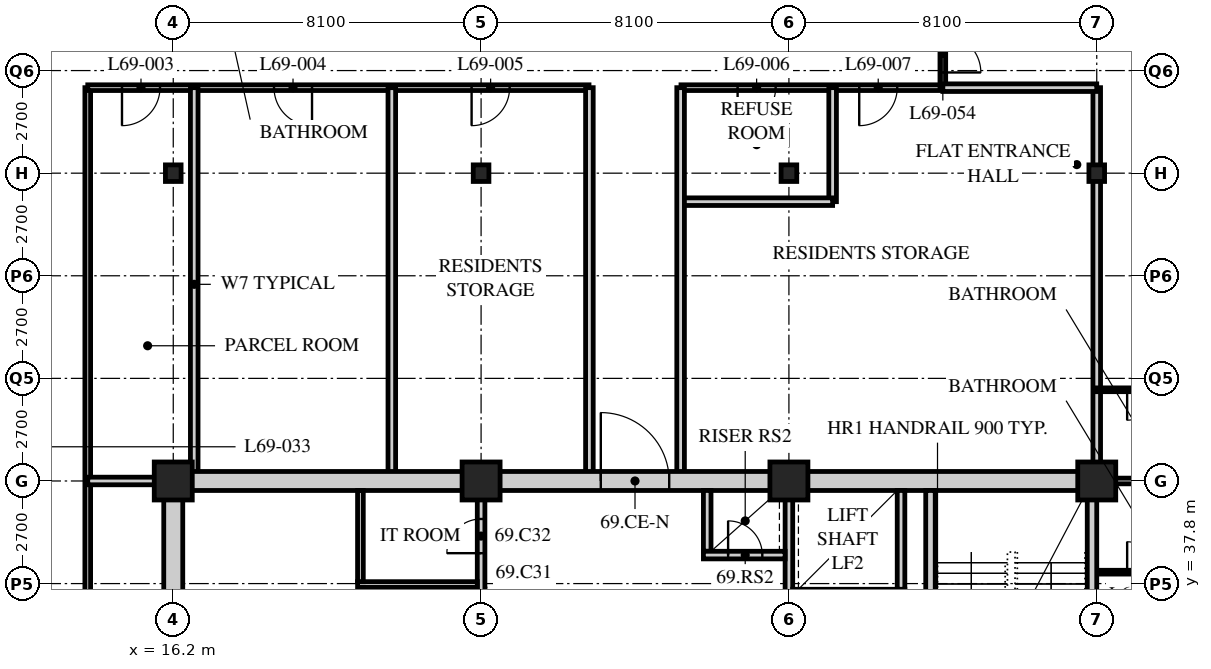
"""IFC4 building model, lengths in metres.
Left out: names, types, materials, properties, quantities, classifications, styles, units other than length and angle.
Written with IfcOpenShell. Run it as: python <this file> out.ifc"""

import sys

from ifc_helpers import new_model, si_unit, direction, frame, frame_2d, origin, origin_2d, place, context, subcontext, project, spatial, rectangle, hollow_rectangle, i_section, extrude, element, fill, save


model = new_model("IFC4")
c1 = context("Model", 3, precision=1e-05, world=origin(), true_north=direction((0.0, 1.0)))
c2 = subcontext(c1, "Body", "Model", "MODEL_VIEW")
j1 = project(units=[si_unit("LENGTHUNIT", "METRE"), si_unit("PLANEANGLEUNIT", "RADIAN")], contexts=[c1])
p1 = place(None, origin())
s1 = spatial("IfcSite", under=j1, at=p1, CompositionType="ELEMENT")
p2 = place(p1, origin())
s2 = spatial("IfcBuilding", under=s1, at=p2, CompositionType="ELEMENT")
p3 = place(p2, frame((0.0, 0.0, 269.7)))
s3 = spatial("IfcBuildingStorey", under=s2, at=p3, CompositionType="ELEMENT", Elevation=269.7)
p4 = place(p3, frame((16.2, 40.5, 0.0), z_axis=(0.0, 0.0, 1.0), x_axis=(1.0, 0.0, 0.0)))
e1 = element("IfcColumn", 1, at=p4, inside=s3, PredefinedType="COLUMN", context=c2, shape_type="SweptSolid", body=[
    extrude(hollow_rectangle(XDim=1.0, YDim=1.0, WallThickness=0.1, at=origin_2d()), origin(), (0.0, 0.0, 1.0), 3.9),
])
p5 = place(p3, frame((16.2, 48.6, 0.0), z_axis=(0.0, 0.0, 1.0), x_axis=(1.0, 0.0, 0.0)))
e2 = element("IfcColumn", 2, at=p5, inside=s3, PredefinedType="COLUMN", context=c2, shape_type="SweptSolid", body=[
    extrude(i_section(OverallWidth=0.412, OverallDepth=0.437, WebThickness=0.036, FlangeThickness=0.058, FilletRadius=0.015, at=origin_2d()), origin(), (0.0, 0.0, 1.0), 3.9),
])
p6 = place(p3, frame((24.3, 40.5, 0.0), z_axis=(0.0, 0.0, 1.0), x_axis=(1.0, 0.0, 0.0)))
e3 = element("IfcColumn", 3, at=p6, inside=s3, PredefinedType="COLUMN", context=c2, shape_type="SweptSolid", body=[
    extrude(hollow_rectangle(XDim=1.0, YDim=1.0, WallThickness=0.1, at=origin_2d()), origin(), (0.0, 0.0, 1.0), 3.9),
])
p7 = place(p3, frame((24.3, 48.6, 0.0), z_axis=(0.0, 0.0, 1.0), x_axis=(1.0, 0.0, 0.0)))
e4 = element("IfcColumn", 4, at=p7, inside=s3, PredefinedType="COLUMN", context=c2, shape_type="SweptSolid", body=[
    extrude(i_section(OverallWidth=0.412, OverallDepth=0.437, WebThickness=0.036, FlangeThickness=0.058, FilletRadius=0.015, at=origin_2d()), origin(), (0.0, 0.0, 1.0), 3.9),
])
p8 = place(p3, frame((32.4, 40.5, 0.0), z_axis=(0.0, 0.0, 1.0), x_axis=(1.0, 0.0, 0.0)))
e5 = element("IfcColumn", 5, at=p8, inside=s3, PredefinedType="COLUMN", context=c2, shape_type="SweptSolid", body=[
    extrude(hollow_rectangle(XDim=1.0, YDim=1.0, WallThickness=0.1, at=origin_2d()), origin(), (0.0, 0.0, 1.0), 3.9),
])
p9 = place(p3, frame((32.4, 48.6, 0.0), z_axis=(0.0, 0.0, 1.0), x_axis=(1.0, 0.0, 0.0)))
e6 = element("IfcColumn", 6, at=p9, inside=s3, PredefinedType="COLUMN", context=c2, shape_type="SweptSolid", body=[
    extrude(i_section(OverallWidth=0.412, OverallDepth=0.437, WebThickness=0.036, FlangeThickness=0.058, FilletRadius=0.015, at=origin_2d()), origin(), (0.0, 0.0, 1.0), 3.9),
])
p10 = place(p3, frame((40.5, 40.5, 0.0), z_axis=(0.0, 0.0, 1.0), x_axis=(1.0, 0.0, 0.0)))
e7 = element("IfcColumn", 7, at=p10, inside=s3, PredefinedType="COLUMN", context=c2, shape_type="SweptSolid", body=[
    extrude(hollow_rectangle(XDim=1.0, YDim=1.0, WallThickness=0.1, at=origin_2d()), origin(), (0.0, 0.0, 1.0), 3.9),
])
p11 = place(p3, frame((40.5, 48.6, 0.0), z_axis=(0.0, 0.0, 1.0), x_axis=(1.0, 0.0, 0.0)))
e8 = element("IfcColumn", 8, at=p11, inside=s3, PredefinedType="COLUMN", context=c2, shape_type="SweptSolid", body=[
    extrude(i_section(OverallWidth=0.412, OverallDepth=0.437, WebThickness=0.036, FlangeThickness=0.058, FilletRadius=0.015, at=origin_2d()), origin(), (0.0, 0.0, 1.0), 3.9),
])
p12 = place(p3, frame((13.95, 24.3, 0.0), z_axis=(0.0, 0.0, 1.0), x_axis=(0.0, 1.0, 0.0)))
e9 = element("IfcWall", 9, at=p12, inside=s3, PredefinedType="PARTITIONING", context=c2, shape_type="SweptSolid", body=[
    extrude(rectangle(XDim=26.55, YDim=0.15, at=frame_2d((13.275, 0.0))), origin(), (0.0, 0.0, 1.0), 3.69),
])
p13 = place(p12, frame((3.55, 0.0, 0.0)))
e10 = element("IfcOpeningElement", 10, at=p13, cuts=e9, PredefinedType="OPENING", context=c2, shape_type="SweptSolid", body=[
    extrude(rectangle(XDim=1.0, YDim=2.1, at=frame_2d((0.5, 1.05))), frame((0.0, 0.085, 0.0), z_axis=(0.0, -1.0, 0.0), x_axis=(1.0, 0.0, 0.0)), (0.0, 0.0, 1.0), 0.17),
])
p14 = place(p12, frame((11.65, 0.0, 0.0)))
e11 = element("IfcOpeningElement", 11, at=p14, cuts=e9, PredefinedType="OPENING", context=c2, shape_type="SweptSolid", body=[
    extrude(rectangle(XDim=1.0, YDim=2.1, at=frame_2d((0.5, 1.05))), frame((0.0, 0.085, 0.0), z_axis=(0.0, -1.0, 0.0), x_axis=(1.0, 0.0, 0.0)), (0.0, 0.0, 1.0), 0.17),
])
p15 = place(p3, frame((13.95, 50.85, 0.0), z_axis=(0.0, 0.0, 1.0), x_axis=(1.0, 0.0, 0.0)))
e12 = element("IfcWall", 12, at=p15, inside=s3, PredefinedType="PARTITIONING", context=c2, shape_type="SweptSolid", body=[
    extrude(rectangle(XDim=13.19, YDim=0.15, at=frame_2d((6.595, 0.0))), origin(), (0.0, 0.0, 1.0), 3.69),
])
p16 = place(p15, frame((0.901, 0.0, 0.0)))
e13 = element("IfcOpeningElement", 13, at=p16, cuts=e12, PredefinedType="OPENING", context=c2, shape_type="SweptSolid", body=[
    extrude(rectangle(XDim=1.0, YDim=2.1, at=frame_2d((0.5, 1.05))), frame((0.0, 0.085, 0.0), z_axis=(0.0, -1.0, 0.0), x_axis=(1.0, 0.0, 0.0)), (0.0, 0.0, 1.0), 0.17),
])
p17 = place(p15, frame((4.901, 0.0, 0.0)))
e14 = element("IfcOpeningElement", 14, at=p17, cuts=e12, PredefinedType="OPENING", context=c2, shape_type="SweptSolid", body=[
    extrude(rectangle(XDim=1.0, YDim=2.1, at=frame_2d((0.5, 1.05))), frame((0.0, 0.085, 0.0), z_axis=(0.0, -1.0, 0.0), x_axis=(1.0, 0.0, 0.0)), (0.0, 0.0, 1.0), 0.17),
])
p18 = place(p15, frame((10.101, 0.0, 0.0)))
e15 = element("IfcOpeningElement", 15, at=p18, cuts=e12, PredefinedType="OPENING", context=c2, shape_type="SweptSolid", body=[
    extrude(rectangle(XDim=1.0, YDim=2.1, at=frame_2d((0.5, 1.05))), frame((0.0, 0.085, 0.0), z_axis=(0.0, -1.0, 0.0), x_axis=(1.0, 0.0, 0.0)), (0.0, 0.0, 1.0), 0.17),
])
p19 = place(p3, frame((29.56, 50.85, 0.0), z_axis=(0.0, 0.0, 1.0), x_axis=(1.0, 0.0, 0.0)))
e16 = element("IfcWall", 16, at=p19, inside=s3, PredefinedType="PARTITIONING", context=c2, shape_type="SweptSolid", body=[
    extrude(rectangle(XDim=6.89, YDim=0.15, at=frame_2d((3.445, 0.0))), origin(), (0.0, 0.0, 1.0), 3.69),
])
p20 = place(p19, frame((1.49, 0.0, 0.0)))
e17 = element("IfcOpeningElement", 17, at=p20, cuts=e16, PredefinedType="OPENING", context=c2, shape_type="SweptSolid", body=[
    extrude(rectangle(XDim=1.0, YDim=2.1, at=frame_2d((0.5, 1.05))), frame((0.0, 0.085, 0.0), z_axis=(0.0, -1.0, 0.0), x_axis=(1.0, 0.0, 0.0)), (0.0, 0.0, 1.0), 0.17),
])
p21 = place(p19, frame((4.69, 0.0, 0.0)))
e18 = element("IfcOpeningElement", 18, at=p21, cuts=e16, PredefinedType="OPENING", context=c2, shape_type="SweptSolid", body=[
    extrude(rectangle(XDim=1.0, YDim=2.1, at=frame_2d((0.5, 1.05))), frame((0.0, 0.085, 0.0), z_axis=(0.0, -1.0, 0.0), x_axis=(1.0, 0.0, 0.0)), (0.0, 0.0, 1.0), 0.17),
])
for number, where, z_axis, x_axis in (
    (19, (16.752, 50.85, 0.0), (0.0, 0.0, 1.0), (0.0, -1.0, 0.0)),
    (20, (21.951, 50.85, 0.0), (0.0, 0.0, 1.0), (0.0, -1.0, 0.0)),
):
    element("IfcWall", number, at=place(p3, frame(where, z_axis=z_axis, x_axis=x_axis)), inside=s3, PredefinedType="SOLIDWALL", context=c2, shape_type="SweptSolid", body=[
        extrude(rectangle(XDim=10.35, YDim=0.2, at=frame_2d((5.175, 0.0))), origin(), (0.0, 0.0, 1.0), 3.69),
    ])
p22 = place(p3, frame((33.55, 50.85, 0.0), z_axis=(0.0, 0.0, 1.0), x_axis=(0.0, -1.0, 0.0)))
e21 = element("IfcWall", 21, at=p22, inside=s3, PredefinedType="SOLIDWALL", context=c2, shape_type="SweptSolid", body=[
    extrude(rectangle(XDim=3.0, YDim=0.2, at=frame_2d((1.5, 0.0))), origin(), (0.0, 0.0, 1.0), 3.69),
])
p23 = place(p3, frame((29.55, 47.85, 0.0), z_axis=(0.0, 0.0, 1.0), x_axis=(1.0, 0.0, 0.0)))
e22 = element("IfcWall", 22, at=p23, inside=s3, PredefinedType="SOLIDWALL", context=c2, shape_type="SweptSolid", body=[
    extrude(rectangle(XDim=4.0, YDim=0.2, at=frame_2d((2.0, 0.0))), origin(), (0.0, 0.0, 1.0), 3.69),
])
for number, where, z_axis, x_axis in (
    (23, (27.15, 40.5, 0.0), (0.0, 0.0, 1.0), (0.0, 1.0, 0.0)),
    (24, (29.55, 40.5, 0.0), (0.0, 0.0, 1.0), (0.0, 1.0, 0.0)),
):
    element("IfcWall", number, at=place(p3, frame(where, z_axis=z_axis, x_axis=x_axis)), inside=s3, PredefinedType="SOLIDWALL", context=c2, shape_type="SweptSolid", body=[
        extrude(rectangle(XDim=10.35, YDim=0.2, at=frame_2d((5.175, 0.0))), origin(), (0.0, 0.0, 1.0), 3.69),
    ])
p24 = place(p3, frame((36.45, 50.85, 0.0), z_axis=(0.0, 0.0, 1.0), x_axis=(0.0, 1.0, 0.0)))
e25 = element("IfcWall", 25, at=p24, inside=s3, PredefinedType="PARTITIONING", context=c2, shape_type="SweptSolid", body=[
    extrude(rectangle(XDim=1.8, YDim=0.15, at=frame_2d((0.9, 0.0))), origin(), (0.0, 0.0, 1.0), 3.69),
])
p25 = place(p24, frame((0.4, 0.0, 0.0)))
e26 = element("IfcOpeningElement", 26, at=p25, cuts=e25, PredefinedType="OPENING", context=c2, shape_type="SweptSolid", body=[
    extrude(rectangle(XDim=1.0, YDim=2.1, at=frame_2d((0.5, 1.05))), frame((0.0, 0.085, 0.0), z_axis=(0.0, -1.0, 0.0), x_axis=(1.0, 0.0, 0.0)), (0.0, 0.0, 1.0), 0.17),
])
p26 = place(p3, frame((40.5, 40.5, 0.0), z_axis=(0.0, 0.0, 1.0), x_axis=(0.0, 1.0, 0.0)))
e27 = element("IfcWall", 27, at=p26, inside=s3, PredefinedType="SOLIDWALL", context=c2, shape_type="SweptSolid", body=[
    extrude(rectangle(XDim=10.35, YDim=0.2, at=frame_2d((5.175, 0.0))), origin(), (0.0, 0.0, 1.0), 3.078),
])
p27 = place(p3, frame((13.95, 40.5, 0.0), z_axis=(0.0, 0.0, 1.0), x_axis=(1.0, 0.0, 0.0)))
e28 = element("IfcWall", 28, at=p27, inside=s3, PredefinedType="SOLIDWALL", context=c2, shape_type="SweptSolid", body=[
    extrude(rectangle(XDim=2.25, YDim=0.2, at=frame_2d((1.125, 0.0))), origin(), (0.0, 0.0, 1.0), 3.078),
])
p28 = place(p3, frame((40.5, 38.1, 0.0), z_axis=(0.0, 0.0, 1.0), x_axis=(1.0, 0.0, 0.0)))
e29 = element("IfcWall", 29, at=p28, inside=s3, PredefinedType="PARTITIONING", context=c2, shape_type="SweptSolid", body=[
    extrude(rectangle(XDim=2.4, YDim=0.1, at=frame_2d((1.2, 0.0))), origin(), (0.0, 0.0, 1.0), 3.69),
])
p29 = place(p28, frame((0.8, 0.0, 0.0)))
e30 = element("IfcOpeningElement", 30, at=p29, cuts=e29, PredefinedType="OPENING", context=c2, shape_type="SweptSolid", body=[
    extrude(rectangle(XDim=0.8, YDim=2.1, at=frame_2d((0.4, 1.05))), frame((0.0, 0.06, 0.0), z_axis=(0.0, -1.0, 0.0), x_axis=(1.0, 0.0, 0.0)), (0.0, 0.0, 1.0), 0.12),
])
p30 = place(p3, frame((40.5, 40.5, 0.0), z_axis=(0.0, 0.0, 1.0), x_axis=(1.0, 0.0, 0.0)))
e31 = element("IfcWall", 31, at=p30, inside=s3, PredefinedType="PARTITIONING", context=c2, shape_type="SweptSolid", body=[
    extrude(rectangle(XDim=15.9, YDim=0.15, at=frame_2d((7.95, 0.0))), origin(), (0.0, 0.0, 1.0), 3.078),
])
p31 = place(p3, frame((40.5, 42.9, 0.0), z_axis=(0.0, 0.0, 1.0), x_axis=(1.0, 0.0, 0.0)))
e32 = element("IfcWall", 32, at=p31, inside=s3, PredefinedType="PARTITIONING", context=c2, shape_type="SweptSolid", body=[
    extrude(rectangle(XDim=2.4, YDim=0.1, at=frame_2d((1.2, 0.0))), origin(), (0.0, 0.0, 1.0), 3.69),
])
p32 = place(p31, frame((0.8, 0.0, 0.0)))
e33 = element("IfcOpeningElement", 33, at=p32, cuts=e32, PredefinedType="OPENING", context=c2, shape_type="SweptSolid", body=[
    extrude(rectangle(XDim=0.8, YDim=2.1, at=frame_2d((0.4, 1.05))), frame((0.0, 0.06, 0.0), z_axis=(0.0, -1.0, 0.0), x_axis=(1.0, 0.0, 0.0)), (0.0, 0.0, 1.0), 0.12),
])
p33 = place(p3, frame((36.45, 50.85, 0.0), z_axis=(0.0, 0.0, 1.0), x_axis=(1.0, 0.0, 0.0)))
e34 = element("IfcWall", 34, at=p33, inside=s3, PredefinedType="SOLIDWALL", context=c2, shape_type="SweptSolid", body=[
    extrude(rectangle(XDim=4.05, YDim=0.2, at=frame_2d((2.025, 0.0))), origin(), (0.0, 0.0, 1.0), 3.69),
])
p34 = place(p3, frame((15.95, 40.5, 0.0), z_axis=(0.0, 0.0, 1.0), x_axis=(1.0, 0.0, 0.0)))
e35 = element("IfcWall", 35, at=p34, inside=s3, PredefinedType="SOLIDWALL", context=c2, shape_type="SweptSolid", body=[
    extrude(rectangle(XDim=24.55, YDim=0.5, at=frame_2d((12.275, 0.0))), origin(), (0.0, 0.0, 1.0), 3.04),
])
p35 = place(p34, frame((11.5, 0.0, 0.0)))
e36 = element("IfcOpeningElement", 36, at=p35, cuts=e35, PredefinedType="OPENING", context=c2, shape_type="SweptSolid", body=[
    extrude(rectangle(XDim=1.8, YDim=2.4, at=frame_2d((0.9, 1.2))), frame((0.0, 0.26, 0.0), z_axis=(0.0, -1.0, 0.0), x_axis=(1.0, 0.0, 0.0)), (0.0, 0.0, 1.0), 0.52),
])
p36 = place(p3, frame((16.2, 24.55, 0.0), z_axis=(0.0, 0.0, 1.0), x_axis=(0.0, 1.0, 0.0)))
e37 = element("IfcWall", 37, at=p36, inside=s3, PredefinedType="SOLIDWALL", context=c2, shape_type="SweptSolid", body=[
    extrude(rectangle(XDim=15.7, YDim=0.5, at=frame_2d((7.85, 0.0))), origin(), (0.0, 0.0, 1.0), 3.078),
])
p37 = place(p3, frame((40.375, 24.55, 0.0), z_axis=(0.0, 0.0, 1.0), x_axis=(0.0, 1.0, 0.0)))
e38 = element("IfcWall", 38, at=p37, inside=s3, PredefinedType="SOLIDWALL", context=c2, shape_type="SweptSolid", body=[
    extrude(rectangle(XDim=15.7, YDim=0.25, at=frame_2d((7.85, 0.0))), origin(), (0.0, 0.0, 1.0), 3.078),
])
p38 = place(p3, frame((32.4, 32.5, 0.0), z_axis=(0.0, 0.0, 1.0), x_axis=(0.0, 1.0, 0.0)))
e39 = element("IfcWall", 39, at=p38, inside=s3, PredefinedType="SOLIDWALL", context=c2, shape_type="SweptSolid", body=[
    extrude(rectangle(XDim=7.75, YDim=0.2, at=frame_2d((3.875, 0.0))), origin(), (0.0, 0.0, 1.0), 3.078),
])
p39 = place(p38, frame((1.9, 0.0, 0.0)))
e40 = element("IfcOpeningElement", 40, at=p39, cuts=e39, PredefinedType="OPENING", context=c2, shape_type="SweptSolid", body=[
    extrude(rectangle(XDim=1.2, YDim=2.1, at=frame_2d((0.6, 1.05))), frame((0.0, 0.11, 0.0), z_axis=(0.0, -1.0, 0.0), x_axis=(1.0, 0.0, 0.0)), (0.0, 0.0, 1.0), 0.22),
])
p40 = place(p3, frame((36.125, 32.5, 0.0), z_axis=(0.0, 0.0, 1.0), x_axis=(0.0, 1.0, 0.0)))
e41 = element("IfcWall", 41, at=p40, inside=s3, PredefinedType="SOLIDWALL", context=c2, shape_type="SweptSolid", body=[
    extrude(rectangle(XDim=7.75, YDim=0.25, at=frame_2d((3.875, 0.0))), origin(), (0.0, 0.0, 1.0), 3.69),
])
p41 = place(p40, frame((0.45, 0.0, 0.0)))
e42 = element("IfcOpeningElement", 42, at=p41, cuts=e41, PredefinedType="OPENING", context=c2, shape_type="SweptSolid", body=[
    extrude(rectangle(XDim=1.2, YDim=2.1, at=frame_2d((0.6, 1.05))), frame((0.0, 0.135, 0.0), z_axis=(0.0, -1.0, 0.0), x_axis=(1.0, 0.0, 0.0)), (0.0, 0.0, 1.0), 0.27),
])
p42 = place(p3, frame((35.35, 37.65, 0.0), z_axis=(0.0, 0.0, 1.0), x_axis=(0.0, 1.0, 0.0)))
e43 = element("IfcWall", 43, at=p42, inside=s3, PredefinedType="SOLIDWALL", context=c2, shape_type="SweptSolid", body=[
    extrude(rectangle(XDim=2.6, YDim=0.2, at=frame_2d((1.3, 0.0))), origin(), (0.0, 0.0, 1.0), 3.69),
])
p43 = place(p3, frame((30.25, 38.65, 0.0), z_axis=(0.0, 0.0, 1.0), x_axis=(0.0, 1.0, 0.0)))
e44 = element("IfcWall", 44, at=p43, inside=s3, PredefinedType="SOLIDWALL", context=c2, shape_type="SweptSolid", body=[
    extrude(rectangle(XDim=1.6, YDim=0.2, at=frame_2d((0.8, 0.0))), origin(), (0.0, 0.0, 1.0), 3.69),
])
p44 = place(p3, frame((30.15, 38.55, 0.0), z_axis=(0.0, 0.0, 1.0), x_axis=(1.0, 0.0, 0.0)))
e45 = element("IfcWall", 45, at=p44, inside=s3, PredefinedType="SOLIDWALL", context=c2, shape_type="SweptSolid", body=[
    extrude(rectangle(XDim=2.15, YDim=0.2, at=frame_2d((1.075, 0.0))), origin(), (0.0, 0.0, 1.0), 3.69),
])
p45 = place(p44, frame((0.65, 0.0, 0.0)))
e46 = element("IfcOpeningElement", 46, at=p45, cuts=e45, PredefinedType="OPENING", context=c2, shape_type="SweptSolid", body=[
    extrude(rectangle(XDim=0.9, YDim=2.1, at=frame_2d((0.45, 1.05))), frame((0.0, 0.11, 0.0), z_axis=(0.0, -1.0, 0.0), x_axis=(1.0, 0.0, 0.0)), (0.0, 0.0, 1.0), 0.22),
])
p46 = place(p3, frame((24.3, 32.5, 0.0), z_axis=(0.0, 0.0, 1.0), x_axis=(0.0, 1.0, 0.0)))
e47 = element("IfcWall", 47, at=p46, inside=s3, PredefinedType="PARTITIONING", context=c2, shape_type="SweptSolid", body=[
    extrude(rectangle(XDim=7.75, YDim=0.2, at=frame_2d((3.875, 0.0))), origin(), (0.0, 0.0, 1.0), 3.078),
])
p47 = place(p46, frame((1.275, 0.0, 0.0)))
e48 = element("IfcOpeningElement", 48, at=p47, cuts=e47, PredefinedType="OPENING", context=c2, shape_type="SweptSolid", body=[
    extrude(rectangle(XDim=1.0, YDim=2.1, at=frame_2d((0.5, 1.05))), frame((0.0, 0.11, 0.0), z_axis=(0.0, -1.0, 0.0), x_axis=(1.0, 0.0, 0.0)), (0.0, 0.0, 1.0), 0.22),
])
p48 = place(p46, frame((4.0, 0.0, 0.0)))
e49 = element("IfcOpeningElement", 49, at=p48, cuts=e47, PredefinedType="OPENING", context=c2, shape_type="SweptSolid", body=[
    extrude(rectangle(XDim=0.9, YDim=2.1, at=frame_2d((0.45, 1.05))), frame((0.0, 0.11, 0.0), z_axis=(0.0, -1.0, 0.0), x_axis=(1.0, 0.0, 0.0)), (0.0, 0.0, 1.0), 0.22),
])
p49 = place(p46, frame((6.1, 0.0, 0.0)))
e50 = element("IfcOpeningElement", 50, at=p49, cuts=e47, PredefinedType="OPENING", context=c2, shape_type="SweptSolid", body=[
    extrude(rectangle(XDim=0.9, YDim=2.1, at=frame_2d((0.45, 1.05))), frame((0.0, 0.11, 0.0), z_axis=(0.0, -1.0, 0.0), x_axis=(1.0, 0.0, 0.0)), (0.0, 0.0, 1.0), 0.22),
])
p50 = place(p3, frame((21.05, 37.775, 0.0), z_axis=(0.0, 0.0, 1.0), x_axis=(1.0, 0.0, 0.0)))
e51 = element("IfcWall", 51, at=p50, inside=s3, PredefinedType="PARTITIONING", context=c2, shape_type="SweptSolid", body=[
    extrude(rectangle(XDim=3.15, YDim=0.15, at=frame_2d((1.575, 0.0))), origin(), (0.0, 0.0, 1.0), 3.69),
])
p51 = place(p3, frame((21.125, 37.85, 0.0), z_axis=(0.0, 0.0, 1.0), x_axis=(0.0, 1.0, 0.0)))
e52 = element("IfcWall", 52, at=p51, inside=s3, PredefinedType="PARTITIONING", context=c2, shape_type="SweptSolid", body=[
    extrude(rectangle(XDim=2.4, YDim=0.15, at=frame_2d((1.2, 0.0))), origin(), (0.0, 0.0, 1.0), 3.69),
])
p52 = place(p16, origin())
e53 = element("IfcDoor", 53, at=p52, inside=s3, OperationType="SINGLE_SWING_RIGHT", PredefinedType="DOOR", context=c2, shape_type="SweptSolid", body=[
    extrude(rectangle(XDim=1.0, YDim=2.1, at=frame_2d((0.5, 1.05))), frame((0.0, 0.025, 0.0), z_axis=(0.0, -1.0, 0.0), x_axis=(1.0, 0.0, 0.0)), (0.0, 0.0, 1.0), 0.05),
])
fill(e13, e53)
p53 = place(p17, origin())
e54 = element("IfcDoor", 54, at=p53, inside=s3, OperationType="SINGLE_SWING_LEFT", PredefinedType="DOOR", context=c2, shape_type="SweptSolid", body=[
    extrude(rectangle(XDim=1.0, YDim=2.1, at=frame_2d((0.5, 1.05))), frame((0.0, 0.025, 0.0), z_axis=(0.0, -1.0, 0.0), x_axis=(1.0, 0.0, 0.0)), (0.0, 0.0, 1.0), 0.05),
])
fill(e14, e54)
p54 = place(p18, origin())
e55 = element("IfcDoor", 55, at=p54, inside=s3, OperationType="SINGLE_SWING_RIGHT", PredefinedType="DOOR", context=c2, shape_type="SweptSolid", body=[
    extrude(rectangle(XDim=1.0, YDim=2.1, at=frame_2d((0.5, 1.05))), frame((0.0, 0.025, 0.0), z_axis=(0.0, -1.0, 0.0), x_axis=(1.0, 0.0, 0.0)), (0.0, 0.0, 1.0), 0.05),
])
fill(e15, e55)
p55 = place(p20, origin())
e56 = element("IfcDoor", 56, at=p55, inside=s3, OperationType="SINGLE_SWING_RIGHT", PredefinedType="DOOR", context=c2, shape_type="SweptSolid", body=[
    extrude(rectangle(XDim=1.0, YDim=2.1, at=frame_2d((0.5, 1.05))), frame((0.0, 0.025, 0.0), z_axis=(0.0, -1.0, 0.0), x_axis=(1.0, 0.0, 0.0)), (0.0, 0.0, 1.0), 0.05),
])
fill(e17, e56)
p56 = place(p21, origin())
e57 = element("IfcDoor", 57, at=p56, inside=s3, OperationType="SINGLE_SWING_RIGHT", PredefinedType="DOOR", context=c2, shape_type="SweptSolid", body=[
    extrude(rectangle(XDim=1.0, YDim=2.1, at=frame_2d((0.5, 1.05))), frame((0.0, 0.025, 0.0), z_axis=(0.0, -1.0, 0.0), x_axis=(1.0, 0.0, 0.0)), (0.0, 0.0, 1.0), 0.05),
])
fill(e18, e57)
p57 = place(p29, origin())
e58 = element("IfcDoor", 58, at=p57, inside=s3, OperationType="SINGLE_SWING_LEFT", PredefinedType="DOOR", context=c2, shape_type="SweptSolid", body=[
    extrude(rectangle(XDim=0.8, YDim=2.1, at=frame_2d((0.4, 1.05))), frame((0.0, 0.025, 0.0), z_axis=(0.0, -1.0, 0.0), x_axis=(1.0, 0.0, 0.0)), (0.0, 0.0, 1.0), 0.05),
])
fill(e30, e58)
p58 = place(p25, origin())
e59 = element("IfcDoor", 59, at=p58, inside=s3, OperationType="SINGLE_SWING_RIGHT", PredefinedType="DOOR", context=c2, shape_type="SweptSolid", body=[
    extrude(rectangle(XDim=1.0, YDim=2.1, at=frame_2d((0.5, 1.05))), frame((0.0, 0.025, 0.0), z_axis=(0.0, -1.0, 0.0), x_axis=(1.0, 0.0, 0.0)), (0.0, 0.0, 1.0), 0.05),
])
fill(e26, e59)
p59 = place(p32, origin())
e60 = element("IfcDoor", 60, at=p59, inside=s3, OperationType="SINGLE_SWING_RIGHT", PredefinedType="DOOR", context=c2, shape_type="SweptSolid", body=[
    extrude(rectangle(XDim=0.8, YDim=2.1, at=frame_2d((0.4, 1.05))), frame((0.0, 0.025, 0.0), z_axis=(0.0, -1.0, 0.0), x_axis=(1.0, 0.0, 0.0)), (0.0, 0.0, 1.0), 0.05),
])
fill(e33, e60)
p60 = place(p49, origin())
e61 = element("IfcDoor", 61, at=p60, inside=s3, OperationType="SINGLE_SWING_LEFT", PredefinedType="DOOR", context=c2, shape_type="SweptSolid", body=[
    extrude(rectangle(XDim=0.9, YDim=2.1, at=frame_2d((0.45, 1.05))), frame((0.0, 0.025, 0.0), z_axis=(0.0, -1.0, 0.0), x_axis=(1.0, 0.0, 0.0)), (0.0, 0.0, 1.0), 0.05),
])
fill(e50, e61)
p61 = place(p45, origin())
e62 = element("IfcDoor", 62, at=p61, inside=s3, OperationType="SINGLE_SWING_LEFT", PredefinedType="DOOR", context=c2, shape_type="SweptSolid", body=[
    extrude(rectangle(XDim=0.9, YDim=2.1, at=frame_2d((0.45, 1.05))), frame((0.0, 0.025, 0.0), z_axis=(0.0, -1.0, 0.0), x_axis=(1.0, 0.0, 0.0)), (0.0, 0.0, 1.0), 0.05),
])
fill(e46, e62)
p62 = place(p35, origin())
e63 = element("IfcDoor", 63, at=p62, inside=s3, OperationType="DOUBLE_DOOR_SINGLE_SWING", PredefinedType="DOOR", context=c2, shape_type="SweptSolid", body=[
    extrude(rectangle(XDim=1.8, YDim=2.4, at=frame_2d((0.9, 1.2))), frame((0.0, 0.025, 0.0), z_axis=(0.0, -1.0, 0.0), x_axis=(1.0, 0.0, 0.0)), (0.0, 0.0, 1.0), 0.05),
])
fill(e36, e63)
save(model, sys.argv[1])
